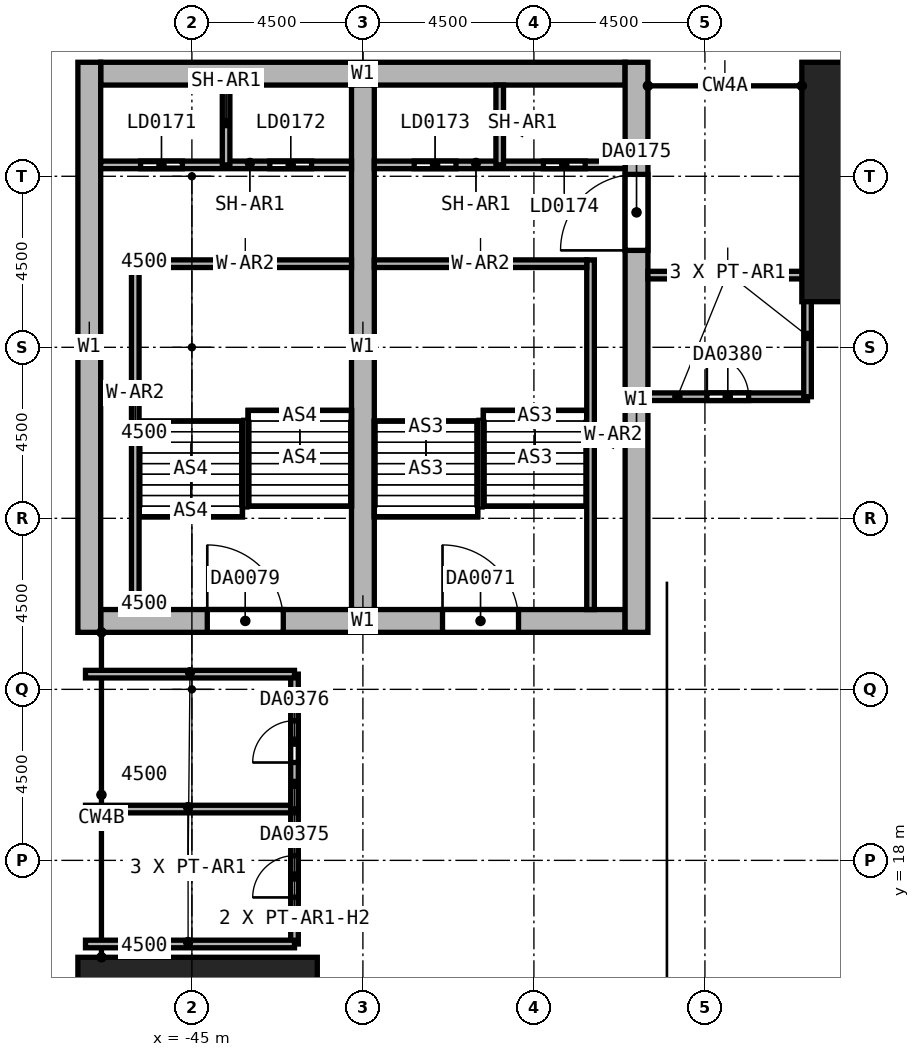
"""IFC4 building model, lengths in metres.
Left out: names, types, materials, properties, quantities, classifications, styles, units other than length and angle.
Written with IfcOpenShell. Run it as: python <this file> out.ifc"""

import sys

from ifc_helpers import new_model, si_unit, direction, frame, frame_2d, origin, origin_2d, place, context, subcontext, project, spatial, rectangle, extrude, element, fill, save


model = new_model("IFC4")
c1 = context("Model", 3, precision=1e-05, world=origin(), true_north=direction((0.0, 1.0)))
c2 = subcontext(c1, "Body", "Model", "MODEL_VIEW")
j1 = project(units=[si_unit("LENGTHUNIT", "METRE"), si_unit("PLANEANGLEUNIT", "RADIAN")], contexts=[c1])
p1 = place(None, origin())
s1 = spatial("IfcSite", under=j1, at=p1, CompositionType="ELEMENT")
p2 = place(p1, origin())
s2 = spatial("IfcBuilding", under=s1, at=p2, CompositionType="ELEMENT")
p3 = place(p2, frame((0.0, 0.0, 19.0)))
s3 = spatial("IfcBuildingStorey", under=s2, at=p3, CompositionType="ELEMENT", Elevation=19.0)
for number, where, z_axis, x_axis in (
    (1, (-27.0, 35.85, 0.0), (0.0, 0.0, 1.0), (1.0, 0.0, 0.0)),
    (2, (-44.85, 13.5, 0.0), (0.0, 0.0, 1.0), (0.0, 1.0, 0.0)),
):
    element("IfcColumn", number, at=place(p3, frame(where, z_axis=z_axis, x_axis=x_axis)), inside=s3, PredefinedType="COLUMN", context=c2, shape_type="SweptSolid", body=[
        extrude(rectangle(XDim=3.9, YDim=6.3, at=origin_2d()), origin(), (0.0, 0.0, 1.0), 6.0),
    ])
p4 = place(p3, frame((-47.4, 38.7, 0.0), z_axis=(0.0, 0.0, 1.0), x_axis=(1.0, 0.0, 0.0)))
e3 = element("IfcWall", 3, at=p4, inside=s3, PredefinedType="SHEAR", context=c2, shape_type="SweptSolid", body=[
    extrude(rectangle(XDim=13.8, YDim=0.6, at=frame_2d((6.9, 0.0))), origin(), (0.0, 0.0, 1.0), 6.0),
])
p5 = place(p3, frame((-47.4, 24.3, 0.0), z_axis=(0.0, 0.0, 1.0), x_axis=(1.0, 0.0, 0.0)))
e4 = element("IfcWall", 4, at=p5, inside=s3, PredefinedType="SHEAR", context=c2, shape_type="SweptSolid", body=[
    extrude(rectangle(XDim=13.8, YDim=0.6, at=frame_2d((6.9, 0.0))), origin(), (0.0, 0.0, 1.0), 6.0),
])
p6 = place(p5, frame((8.995, 0.0, 0.0)))
e5 = element("IfcOpeningElement", 5, at=p6, cuts=e4, PredefinedType="OPENING", context=c2, shape_type="SweptSolid", body=[
    extrude(rectangle(XDim=2.0, YDim=2.4, at=frame_2d((1.0, 1.2))), frame((0.0, 0.3, 0.0), z_axis=(0.0, -1.0, 0.0), x_axis=(1.0, 0.0, 0.0)), (0.0, 0.0, 1.0), 0.6),
])
p7 = place(p5, frame((2.805, 0.0, 0.0)))
e6 = element("IfcOpeningElement", 6, at=p7, cuts=e4, PredefinedType="OPENING", context=c2, shape_type="SweptSolid", body=[
    extrude(rectangle(XDim=2.0, YDim=2.4, at=frame_2d((1.0, 1.2))), frame((0.0, 0.3, 0.0), z_axis=(0.0, -1.0, 0.0), x_axis=(1.0, 0.0, 0.0)), (0.0, 0.0, 1.0), 0.6),
])
p8 = place(p3, frame((-47.7, 24.0, 0.0), z_axis=(0.0, 0.0, 1.0), x_axis=(0.0, 1.0, 0.0)))
e7 = element("IfcWall", 7, at=p8, inside=s3, PredefinedType="SHEAR", context=c2, shape_type="SweptSolid", body=[
    extrude(rectangle(XDim=15.0, YDim=0.6, at=frame_2d((7.5, 0.0))), origin(), (0.0, 0.0, 1.0), 6.0),
])
p9 = place(p3, frame((-33.3, 24.0, 0.0), z_axis=(0.0, 0.0, 1.0), x_axis=(0.0, 1.0, 0.0)))
e8 = element("IfcWall", 8, at=p9, inside=s3, PredefinedType="SHEAR", context=c2, shape_type="SweptSolid", body=[
    extrude(rectangle(XDim=15.0, YDim=0.6, at=frame_2d((7.5, 0.0))), origin(), (0.0, 0.0, 1.0), 6.0),
])
p10 = place(p9, frame((10.05, 0.0, 0.0)))
e9 = element("IfcOpeningElement", 9, at=p10, cuts=e8, PredefinedType="OPENING", context=c2, shape_type="SweptSolid", body=[
    extrude(rectangle(XDim=2.0, YDim=2.4, at=frame_2d((1.0, 1.2))), frame((0.0, 0.3, 0.0), z_axis=(0.0, -1.0, 0.0), x_axis=(1.0, 0.0, 0.0)), (0.0, 0.0, 1.0), 0.6),
])
p11 = place(p3, frame((-40.5, 24.6, 0.0), z_axis=(0.0, 0.0, 1.0), x_axis=(0.0, 1.0, 0.0)))
e10 = element("IfcWall", 10, at=p11, inside=s3, PredefinedType="SHEAR", context=c2, shape_type="SweptSolid", body=[
    extrude(rectangle(XDim=13.8, YDim=0.6, at=frame_2d((6.9, 0.0))), origin(), (0.0, 0.0, 1.0), 6.0),
])
p12 = place(p3, frame((-34.51, 24.6, 0.0), z_axis=(0.0, 0.0, 1.0), x_axis=(0.0, 1.0, 0.0)))
e11 = element("IfcWall", 11, at=p12, inside=s3, PredefinedType="SOLIDWALL", context=c2, shape_type="SweptSolid", body=[
    extrude(rectangle(XDim=9.2, YDim=0.2, at=frame_2d((4.6, 0.0))), origin(), (0.0, 0.0, 1.0), 6.0),
])
p13 = place(p3, frame((-40.2, 33.7, 0.0), z_axis=(0.0, 0.0, 1.0), x_axis=(1.0, 0.0, 0.0)))
e12 = element("IfcWall", 12, at=p13, inside=s3, PredefinedType="SOLIDWALL", context=c2, shape_type="SweptSolid", body=[
    extrude(rectangle(XDim=5.59, YDim=0.2, at=frame_2d((2.795, 0.0))), origin(), (0.0, 0.0, 1.0), 6.0),
])
p14 = place(p3, frame((-46.49, 24.6, 0.0), z_axis=(0.0, 0.0, 1.0), x_axis=(0.0, 1.0, 0.0)))
e13 = element("IfcWall", 13, at=p14, inside=s3, PredefinedType="SOLIDWALL", context=c2, shape_type="SweptSolid", body=[
    extrude(rectangle(XDim=9.2, YDim=0.2, at=frame_2d((4.6, 0.0))), origin(), (0.0, 0.0, 1.0), 6.0),
])
p15 = place(p3, frame((-46.39, 33.7, 0.0), z_axis=(0.0, 0.0, 1.0), x_axis=(1.0, 0.0, 0.0)))
e14 = element("IfcWall", 14, at=p15, inside=s3, PredefinedType="SOLIDWALL", context=c2, shape_type="SweptSolid", body=[
    extrude(rectangle(XDim=5.59, YDim=0.2, at=frame_2d((2.795, 0.0))), origin(), (0.0, 0.0, 1.0), 6.0),
])
p16 = place(p3, frame((-47.4, 36.3, 0.0), z_axis=(0.0, 0.0, 1.0), x_axis=(1.0, 0.0, 0.0)))
e15 = element("IfcWall", 15, at=p16, inside=s3, PredefinedType="SHEAR", context=c2, shape_type="SweptSolid", body=[
    extrude(rectangle(XDim=6.6, YDim=0.2, at=frame_2d((3.3, 0.0))), origin(), (0.0, 0.0, 1.0), 6.0),
])
p17 = place(p16, frame((1.05, 0.0, 0.0)))
e16 = element("IfcOpeningElement", 16, at=p17, cuts=e15, PredefinedType="OPENING", context=c2, shape_type="SweptSolid", body=[
    extrude(rectangle(XDim=1.1, YDim=2.4, at=frame_2d((0.55, 1.2))), frame((0.0, 0.1, 0.0), z_axis=(0.0, -1.0, 0.0), x_axis=(1.0, 0.0, 0.0)), (0.0, 0.0, 1.0), 0.2),
])
p18 = place(p16, frame((4.45, 0.0, 0.0)))
e17 = element("IfcOpeningElement", 17, at=p18, cuts=e15, PredefinedType="OPENING", context=c2, shape_type="SweptSolid", body=[
    extrude(rectangle(XDim=1.1, YDim=2.4, at=frame_2d((0.55, 1.2))), frame((0.0, 0.1, 0.0), z_axis=(0.0, -1.0, 0.0), x_axis=(1.0, 0.0, 0.0)), (0.0, 0.0, 1.0), 0.2),
])
p19 = place(p3, frame((-40.2, 36.3, 0.0), z_axis=(0.0, 0.0, 1.0), x_axis=(1.0, 0.0, 0.0)))
e18 = element("IfcWall", 18, at=p19, inside=s3, PredefinedType="SHEAR", context=c2, shape_type="SweptSolid", body=[
    extrude(rectangle(XDim=6.6, YDim=0.2, at=frame_2d((3.3, 0.0))), origin(), (0.0, 0.0, 1.0), 6.0),
])
p20 = place(p19, frame((1.05, 0.0, 0.0)))
e19 = element("IfcOpeningElement", 19, at=p20, cuts=e18, PredefinedType="OPENING", context=c2, shape_type="SweptSolid", body=[
    extrude(rectangle(XDim=1.1, YDim=2.4, at=frame_2d((0.55, 1.2))), frame((0.0, 0.1, 0.0), z_axis=(0.0, -1.0, 0.0), x_axis=(1.0, 0.0, 0.0)), (0.0, 0.0, 1.0), 0.2),
])
p21 = place(p19, frame((4.45, 0.0, 0.0)))
e20 = element("IfcOpeningElement", 20, at=p21, cuts=e18, PredefinedType="OPENING", context=c2, shape_type="SweptSolid", body=[
    extrude(rectangle(XDim=1.1, YDim=2.4, at=frame_2d((0.55, 1.2))), frame((0.0, 0.1, 0.0), z_axis=(0.0, -1.0, 0.0), x_axis=(1.0, 0.0, 0.0)), (0.0, 0.0, 1.0), 0.2),
])
for number, where, z_axis, x_axis in (
    (21, (-36.9, 36.3, 0.0), (0.0, 0.0, 1.0), (0.0, 1.0, 0.0)),
    (22, (-44.1, 36.3, 0.0), (0.0, 0.0, 1.0), (0.0, 1.0, 0.0)),
):
    element("IfcWall", number, at=place(p3, frame(where, z_axis=z_axis, x_axis=x_axis)), inside=s3, PredefinedType="SHEAR", context=c2, shape_type="SweptSolid", body=[
        extrude(rectangle(XDim=2.1, YDim=0.2, at=frame_2d((1.05, 0.0))), origin(), (0.0, 0.0, 1.0), 6.0),
    ])
p22 = place(p3, frame((-42.3, 15.8, 0.0), z_axis=(0.0, 0.0, 1.0), x_axis=(0.0, 1.0, 0.0)))
e23 = element("IfcWall", 23, at=p22, inside=s3, PredefinedType="PARTITIONING", context=c2, shape_type="SweptSolid", body=[
    extrude(rectangle(XDim=3.55, YDim=0.2, at=frame_2d((1.775, 0.0))), origin(), (0.0, 0.0, 1.0), 4.5),
])
p23 = place(p22, frame((1.225, 0.0, 0.0)))
e24 = element("IfcOpeningElement", 24, at=p23, cuts=e23, PredefinedType="OPENING", context=c2, shape_type="SweptSolid", body=[
    extrude(rectangle(XDim=1.1, YDim=2.4, at=frame_2d((0.55, 1.2))), frame((0.0, 0.1, 0.0), z_axis=(0.0, -1.0, 0.0), x_axis=(1.0, 0.0, 0.0)), (0.0, 0.0, 1.0), 0.2),
])
for number, where, z_axis, x_axis in (
    (25, (-42.3, 15.8, 0.0), (0.0, 0.0, 1.0), (-1.0, 0.0, 0.0)),
    (26, (-47.8, 19.35, 0.0), (0.0, 0.0, 1.0), (1.0, 0.0, 0.0)),
):
    element("IfcWall", number, at=place(p3, frame(where, z_axis=z_axis, x_axis=x_axis)), inside=s3, PredefinedType="PARTITIONING", context=c2, shape_type="SweptSolid", body=[
        extrude(rectangle(XDim=5.5, YDim=0.2, at=frame_2d((2.75, 0.0))), origin(), (0.0, 0.0, 1.0), 5.7),
    ])
p24 = place(p3, frame((-42.3, 19.35, 0.0), z_axis=(0.0, 0.0, 1.0), x_axis=(0.0, 1.0, 0.0)))
e27 = element("IfcWall", 27, at=p24, inside=s3, PredefinedType="PARTITIONING", context=c2, shape_type="SweptSolid", body=[
    extrude(rectangle(XDim=3.55, YDim=0.2, at=frame_2d((1.775, 0.0))), origin(), (0.0, 0.0, 1.0), 4.5),
])
p25 = place(p24, frame((1.225, 0.0, 0.0)))
e28 = element("IfcOpeningElement", 28, at=p25, cuts=e27, PredefinedType="OPENING", context=c2, shape_type="SweptSolid", body=[
    extrude(rectangle(XDim=1.1, YDim=2.4, at=frame_2d((0.55, 1.2))), frame((0.0, 0.1, 0.0), z_axis=(0.0, -1.0, 0.0), x_axis=(1.0, 0.0, 0.0)), (0.0, 0.0, 1.0), 0.2),
])
p26 = place(p3, frame((-42.3, 22.9, 0.0), z_axis=(0.0, 0.0, 1.0), x_axis=(-1.0, 0.0, 0.0)))
e29 = element("IfcWall", 29, at=p26, inside=s3, PredefinedType="PARTITIONING", context=c2, shape_type="SweptSolid", body=[
    extrude(rectangle(XDim=5.5, YDim=0.2, at=frame_2d((2.75, 0.0))), origin(), (0.0, 0.0, 1.0), 5.7),
])
p27 = place(p3, frame((-33.0, 30.2, 0.0), z_axis=(0.0, 0.0, 1.0), x_axis=(1.0, 0.0, 0.0)))
e30 = element("IfcWall", 30, at=p27, inside=s3, PredefinedType="PARTITIONING", context=c2, shape_type="SweptSolid", body=[
    extrude(rectangle(XDim=4.2, YDim=0.2, at=frame_2d((2.1, 0.0))), origin(), (0.0, 0.0, 1.0), 5.7),
])
p28 = place(p27, frame((1.55, 0.0, 0.0)))
e31 = element("IfcOpeningElement", 31, at=p28, cuts=e30, PredefinedType="OPENING", context=c2, shape_type="SweptSolid", body=[
    extrude(rectangle(XDim=1.1, YDim=2.4, at=frame_2d((0.55, 1.2))), frame((0.0, 0.1, 0.0), z_axis=(0.0, -1.0, 0.0), x_axis=(1.0, 0.0, 0.0)), (0.0, 0.0, 1.0), 0.2),
])
p29 = place(p3, frame((-28.8, 30.2, 0.0), z_axis=(0.0, 0.0, 1.0), x_axis=(0.0, 1.0, 0.0)))
e32 = element("IfcWall", 32, at=p29, inside=s3, PredefinedType="PARTITIONING", context=c2, shape_type="SweptSolid", body=[
    extrude(rectangle(XDim=3.2, YDim=0.2, at=frame_2d((1.6, 0.0))), origin(), (0.0, 0.0, 1.0), 5.7),
])
p30 = place(p3, frame((-33.0, 33.4, 0.0), z_axis=(0.0, 0.0, 1.0), x_axis=(1.0, 0.0, 0.0)))
e33 = element("IfcWall", 33, at=p30, inside=s3, PredefinedType="PARTITIONING", context=c2, shape_type="SweptSolid", body=[
    extrude(rectangle(XDim=4.2, YDim=0.2, at=frame_2d((2.1, 0.0))), origin(), (0.0, 0.0, 1.0), 5.7),
])
p31 = place(p6, origin())
e34 = element("IfcDoor", 34, at=p31, inside=s3, OperationType="DOUBLE_DOOR_SINGLE_SWING", PredefinedType="DOOR", context=c2, shape_type="SweptSolid", body=[
    extrude(rectangle(XDim=2.0, YDim=2.4, at=frame_2d((1.0, 1.2))), frame((0.0, 0.025, 0.0), z_axis=(0.0, -1.0, 0.0), x_axis=(1.0, 0.0, 0.0)), (0.0, 0.0, 1.0), 0.05),
])
fill(e5, e34)
p32 = place(p7, origin())
e35 = element("IfcDoor", 35, at=p32, inside=s3, OperationType="DOUBLE_DOOR_SINGLE_SWING", PredefinedType="DOOR", context=c2, shape_type="SweptSolid", body=[
    extrude(rectangle(XDim=2.0, YDim=2.4, at=frame_2d((1.0, 1.2))), frame((0.0, 0.025, 0.0), z_axis=(0.0, -1.0, 0.0), x_axis=(1.0, 0.0, 0.0)), (0.0, 0.0, 1.0), 0.05),
])
fill(e6, e35)
p33 = place(p17, origin())
e36 = element("IfcDoor", 36, at=p33, inside=s3, OperationType="DOUBLE_DOOR_SLIDING", PredefinedType="DOOR", context=c2, shape_type="SweptSolid", body=[
    extrude(rectangle(XDim=1.1, YDim=2.4, at=frame_2d((0.55, 1.2))), frame((0.0, 0.025, 0.0), z_axis=(0.0, -1.0, 0.0), x_axis=(1.0, 0.0, 0.0)), (0.0, 0.0, 1.0), 0.05),
])
fill(e16, e36)
p34 = place(p18, origin())
e37 = element("IfcDoor", 37, at=p34, inside=s3, OperationType="DOUBLE_DOOR_SLIDING", PredefinedType="DOOR", context=c2, shape_type="SweptSolid", body=[
    extrude(rectangle(XDim=1.1, YDim=2.4, at=frame_2d((0.55, 1.2))), frame((0.0, 0.025, 0.0), z_axis=(0.0, -1.0, 0.0), x_axis=(1.0, 0.0, 0.0)), (0.0, 0.0, 1.0), 0.05),
])
fill(e17, e37)
p35 = place(p20, origin())
e38 = element("IfcDoor", 38, at=p35, inside=s3, OperationType="DOUBLE_DOOR_SLIDING", PredefinedType="DOOR", context=c2, shape_type="SweptSolid", body=[
    extrude(rectangle(XDim=1.1, YDim=2.4, at=frame_2d((0.55, 1.2))), frame((0.0, 0.025, 0.0), z_axis=(0.0, -1.0, 0.0), x_axis=(1.0, 0.0, 0.0)), (0.0, 0.0, 1.0), 0.05),
])
fill(e19, e38)
p36 = place(p21, origin())
e39 = element("IfcDoor", 39, at=p36, inside=s3, OperationType="DOUBLE_DOOR_SLIDING", PredefinedType="DOOR", context=c2, shape_type="SweptSolid", body=[
    extrude(rectangle(XDim=1.1, YDim=2.4, at=frame_2d((0.55, 1.2))), frame((0.0, 0.025, 0.0), z_axis=(0.0, -1.0, 0.0), x_axis=(1.0, 0.0, 0.0)), (0.0, 0.0, 1.0), 0.05),
])
fill(e20, e39)
p37 = place(p10, origin())
e40 = element("IfcDoor", 40, at=p37, inside=s3, OperationType="DOUBLE_DOOR_SINGLE_SWING", PredefinedType="DOOR", context=c2, shape_type="SweptSolid", body=[
    extrude(rectangle(XDim=2.0, YDim=2.4, at=frame_2d((1.0, 1.2))), frame((0.0, 0.025, 0.0), z_axis=(0.0, -1.0, 0.0), x_axis=(1.0, 0.0, 0.0)), (0.0, 0.0, 1.0), 0.05),
])
fill(e9, e40)
p38 = place(p23, origin())
e41 = element("IfcDoor", 41, at=p38, inside=s3, OperationType="DOUBLE_DOOR_SINGLE_SWING", PredefinedType="DOOR", context=c2, shape_type="SweptSolid", body=[
    extrude(rectangle(XDim=1.1, YDim=2.4, at=frame_2d((0.55, 1.2))), frame((0.0, 0.025, 0.0), z_axis=(0.0, -1.0, 0.0), x_axis=(1.0, 0.0, 0.0)), (0.0, 0.0, 1.0), 0.05),
])
fill(e24, e41)
p39 = place(p25, origin())
e42 = element("IfcDoor", 42, at=p39, inside=s3, OperationType="DOUBLE_DOOR_SINGLE_SWING", PredefinedType="DOOR", context=c2, shape_type="SweptSolid", body=[
    extrude(rectangle(XDim=1.1, YDim=2.4, at=frame_2d((0.55, 1.2))), frame((0.0, 0.025, 0.0), z_axis=(0.0, -1.0, 0.0), x_axis=(1.0, 0.0, 0.0)), (0.0, 0.0, 1.0), 0.05),
])
fill(e28, e42)
p40 = place(p28, origin())
e43 = element("IfcDoor", 43, at=p40, inside=s3, OperationType="DOUBLE_DOOR_SINGLE_SWING", PredefinedType="DOOR", context=c2, shape_type="SweptSolid", body=[
    extrude(rectangle(XDim=1.1, YDim=2.4, at=frame_2d((0.55, 1.2))), frame((0.0, 0.025, 0.0), z_axis=(0.0, -1.0, 0.0), x_axis=(1.0, 0.0, 0.0)), (0.0, 0.0, 1.0), 0.05),
])
fill(e31, e43)
save(model, sys.argv[1])
